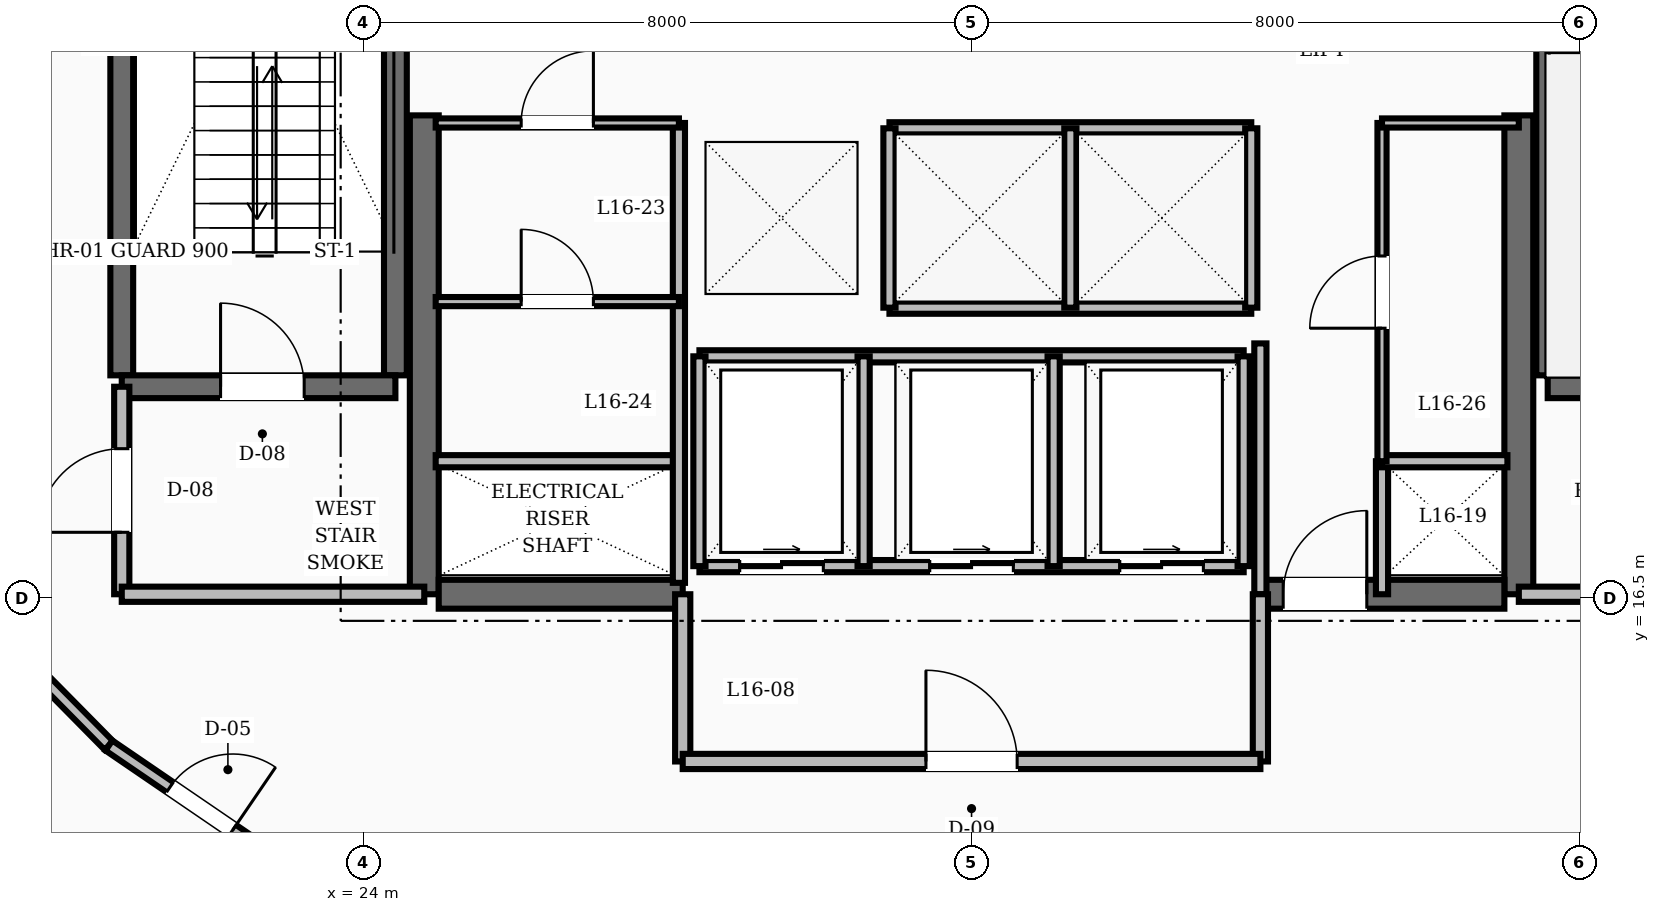
"""IFC4 building model, lengths in metres.
Left out: names, types, materials, properties, quantities, classifications, styles, units other than length and angle.
Written with IfcOpenShell. Run it as: python <this file> out.ifc"""

import sys

from ifc_helpers import new_model, si_unit, direction, frame, frame_2d, origin, place, context, subcontext, project, spatial, rectangle, extrude, element, fill, save


model = new_model("IFC4")
c1 = context("Model", 3, precision=1e-05, world=origin(), true_north=direction((0.0, 1.0)))
c2 = subcontext(c1, "Body", "Model", "MODEL_VIEW")
j1 = project(units=[si_unit("LENGTHUNIT", "METRE"), si_unit("PLANEANGLEUNIT", "RADIAN")], contexts=[c1])
p1 = place(None, origin())
s1 = spatial("IfcSite", under=j1, at=p1, CompositionType="ELEMENT")
p2 = place(p1, origin())
s2 = spatial("IfcBuilding", under=s1, at=p2, CompositionType="ELEMENT")
p3 = place(p2, frame((0.0, 0.0, 66.4)))
s3 = spatial("IfcBuildingStorey", under=s2, at=p3, CompositionType="ELEMENT", Elevation=66.4)
for number, where, z_axis, x_axis in (
    (1, (24.8, 16.55, 0.0), (0.0, 0.0, 1.0), (0.0, 1.0, 0.0)),
    (2, (39.2, 16.55, 0.0), (0.0, 0.0, 1.0), (0.0, 1.0, 0.0)),
):
    element("IfcWall", number, at=place(p3, frame(where, z_axis=z_axis, x_axis=x_axis)), inside=s3, PredefinedType="SHEAR", context=c2, shape_type="SweptSolid", body=[
        extrude(rectangle(XDim=6.3, YDim=0.38, at=frame_2d((3.15, 0.0))), origin(), (0.0, 0.0, 1.0), 3.6),
    ])
p4 = place(p3, frame((24.99, 16.55, 0.0), z_axis=(0.0, 0.0, 1.0), x_axis=(1.0, 0.0, 0.0)))
e3 = element("IfcWall", 3, at=p4, inside=s3, PredefinedType="SHEAR", context=c2, shape_type="SweptSolid", body=[
    extrude(rectangle(XDim=3.21, YDim=0.38, at=frame_2d((1.605, 0.0))), origin(), (0.0, 0.0, 1.0), 3.6),
])
p5 = place(p3, frame((35.8, 16.55, 0.0), z_axis=(0.0, 0.0, 1.0), x_axis=(1.0, 0.0, 0.0)))
e4 = element("IfcWall", 4, at=p5, inside=s3, PredefinedType="SHEAR", context=c2, shape_type="SweptSolid", body=[
    extrude(rectangle(XDim=3.21, YDim=0.38, at=frame_2d((1.605, 0.0))), origin(), (0.0, 0.0, 1.0), 3.6),
])
p6 = place(p5, frame((0.3, 0.0, 0.0)))
e5 = element("IfcOpeningElement", 5, at=p6, cuts=e4, PredefinedType="OPENING", context=c2, shape_type="SweptSolid", body=[
    extrude(rectangle(XDim=1.1, YDim=2.1, at=frame_2d((0.55, 1.05))), frame((0.0, 0.2, 0.0), z_axis=(0.0, -1.0, 0.0), x_axis=(1.0, 0.0, 0.0)), (0.0, 0.0, 1.0), 0.4),
])
for number, where, z_axis, x_axis in (
    (6, (20.82, 19.43, 0.0), (0.0, 0.0, 1.0), (0.0, 1.0, 0.0)),
    (7, (24.42, 19.43, 0.0), (0.0, 0.0, 1.0), (0.0, 1.0, 0.0)),
):
    element("IfcWall", number, at=place(p3, frame(where, z_axis=z_axis, x_axis=x_axis)), inside=s3, PredefinedType="SHEAR", context=c2, shape_type="SweptSolid", body=[
        extrude(rectangle(XDim=8.74, YDim=0.3, at=frame_2d((4.37, 0.0))), origin(), (0.0, 0.0, 1.0), 3.6),
    ])
p7 = place(p3, frame((20.82, 19.28, 0.0), z_axis=(0.0, 0.0, 1.0), x_axis=(1.0, 0.0, 0.0)))
e8 = element("IfcWall", 8, at=p7, inside=s3, PredefinedType="SHEAR", context=c2, shape_type="SweptSolid", body=[
    extrude(rectangle(XDim=3.6, YDim=0.3, at=frame_2d((1.8, 0.0))), origin(), (0.0, 0.0, 1.0), 3.6),
])
p8 = place(p7, frame((1.3, 0.0, 0.0)))
e9 = element("IfcOpeningElement", 9, at=p8, cuts=e8, PredefinedType="OPENING", context=c2, shape_type="SweptSolid", body=[
    extrude(rectangle(XDim=1.1, YDim=2.1, at=frame_2d((0.55, 1.05))), frame((0.0, 0.16, 0.0), z_axis=(0.0, -1.0, 0.0), x_axis=(1.0, 0.0, 0.0)), (0.0, 0.0, 1.0), 0.32),
])
p9 = place(p3, frame((39.58, 19.43, 0.0), z_axis=(0.0, 0.0, 1.0), x_axis=(0.0, 1.0, 0.0)))
e10 = element("IfcWall", 10, at=p9, inside=s3, PredefinedType="SHEAR", context=c2, shape_type="SweptSolid", body=[
    extrude(rectangle(XDim=8.74, YDim=0.3, at=frame_2d((4.37, 0.0))), origin(), (0.0, 0.0, 1.0), 3.6),
])
p10 = place(p3, frame((39.58, 19.28, 0.0), z_axis=(0.0, 0.0, 1.0), x_axis=(1.0, 0.0, 0.0)))
e11 = element("IfcWall", 11, at=p10, inside=s3, PredefinedType="SHEAR", context=c2, shape_type="SweptSolid", body=[
    extrude(rectangle(XDim=3.6, YDim=0.3, at=frame_2d((1.8, 0.0))), origin(), (0.0, 0.0, 1.0), 3.6),
])
p11 = place(p3, frame((20.82, 16.55, 0.0), z_axis=(0.0, 0.0, 1.0), x_axis=(0.0, 1.0, 0.0)))
e12 = element("IfcWall", 12, at=p11, inside=s3, PredefinedType="SOLIDWALL", context=c2, shape_type="SweptSolid", body=[
    extrude(rectangle(XDim=2.73, YDim=0.2, at=frame_2d((1.365, 0.0))), origin(), (0.0, 0.0, 1.0), 2.71),
])
p12 = place(p11, frame((0.815, 0.0, 0.0)))
e13 = element("IfcOpeningElement", 13, at=p12, cuts=e12, PredefinedType="OPENING", context=c2, shape_type="SweptSolid", body=[
    extrude(rectangle(XDim=1.1, YDim=2.1, at=frame_2d((0.55, 1.05))), frame((0.0, 0.11, 0.0), z_axis=(0.0, -1.0, 0.0), x_axis=(1.0, 0.0, 0.0)), (0.0, 0.0, 1.0), 0.22),
])
for number, where, z_axis, x_axis in (
    (14, (20.82, 16.55, 0.0), (0.0, 0.0, 1.0), (1.0, 0.0, 0.0)),
    (15, (39.2, 16.55, 0.0), (0.0, 0.0, 1.0), (1.0, 0.0, 0.0)),
):
    element("IfcWall", number, at=place(p3, frame(where, z_axis=z_axis, x_axis=x_axis)), inside=s3, PredefinedType="SOLIDWALL", context=c2, shape_type="SweptSolid", body=[
        extrude(rectangle(XDim=3.98, YDim=0.2, at=frame_2d((1.99, 0.0))), origin(), (0.0, 0.0, 1.0), 2.71),
    ])
p13 = place(p3, frame((35.8, 16.55, 0.0), z_axis=(0.0, 0.0, 1.0), x_axis=(0.0, 1.0, 0.0)))
e16 = element("IfcWall", 16, at=p13, inside=s3, PredefinedType="SOLIDWALL", context=c2, shape_type="SweptSolid", body=[
    extrude(rectangle(XDim=3.3, YDim=0.16, at=frame_2d((1.65, 0.0))), origin(), (0.0, 0.0, 1.0), 2.71),
])
p14 = place(p3, frame((37.4, 16.55, 0.0), z_axis=(0.0, 0.0, 1.0), x_axis=(0.0, 1.0, 0.0)))
e17 = element("IfcWall", 17, at=p14, inside=s3, PredefinedType="SOLIDWALL", context=c2, shape_type="SweptSolid", body=[
    extrude(rectangle(XDim=1.75, YDim=0.16, at=frame_2d((0.875, 0.0))), origin(), (0.0, 0.0, 1.0), 2.71),
])
for number, where, z_axis, x_axis in (
    (18, (28.2, 14.35, 0.0), (0.0, 0.0, 1.0), (0.0, 1.0, 0.0)),
    (19, (35.8, 14.35, 0.0), (0.0, 0.0, 1.0), (0.0, 1.0, 0.0)),
):
    element("IfcWall", number, at=place(p3, frame(where, z_axis=z_axis, x_axis=x_axis)), inside=s3, PredefinedType="SOLIDWALL", context=c2, shape_type="SweptSolid", body=[
        extrude(rectangle(XDim=2.2, YDim=0.2, at=frame_2d((1.1, 0.0))), origin(), (0.0, 0.0, 1.0), 2.71),
    ])
p15 = place(p3, frame((28.2, 14.35, 0.0), z_axis=(0.0, 0.0, 1.0), x_axis=(1.0, 0.0, 0.0)))
e20 = element("IfcWall", 20, at=p15, inside=s3, PredefinedType="SOLIDWALL", context=c2, shape_type="SweptSolid", body=[
    extrude(rectangle(XDim=7.6, YDim=0.2, at=frame_2d((3.8, 0.0))), origin(), (0.0, 0.0, 1.0), 2.71),
])
p16 = place(p15, frame((3.2, 0.0, 0.0)))
e21 = element("IfcOpeningElement", 21, at=p16, cuts=e20, PredefinedType="OPENING", context=c2, shape_type="SweptSolid", body=[
    extrude(rectangle(XDim=1.2, YDim=2.1, at=frame_2d((0.6, 1.05))), frame((0.0, 0.11, 0.0), z_axis=(0.0, -1.0, 0.0), x_axis=(1.0, 0.0, 0.0)), (0.0, 0.0, 1.0), 0.22),
])
for number, where, z_axis, x_axis in (
    (22, (30.92, 22.68, 0.0), (0.0, 0.0, 1.0), (1.0, 0.0, 0.0)),
    (23, (30.92, 20.32, 0.0), (0.0, 0.0, 1.0), (1.0, 0.0, 0.0)),
):
    element("IfcWall", number, at=place(p3, frame(where, z_axis=z_axis, x_axis=x_axis)), inside=s3, PredefinedType="SOLIDWALL", context=c2, shape_type="SweptSolid", body=[
        extrude(rectangle(XDim=4.76, YDim=0.16, at=frame_2d((2.38, 0.0))), origin(), (0.0, 0.0, 1.0), 2.71),
    ])
for number, where, z_axis, x_axis in (
    (24, (30.92, 20.32, 0.0), (0.0, 0.0, 1.0), (0.0, 1.0, 0.0)),
    (25, (33.3, 20.32, 0.0), (0.0, 0.0, 1.0), (0.0, 1.0, 0.0)),
    (26, (35.68, 20.32, 0.0), (0.0, 0.0, 1.0), (0.0, 1.0, 0.0)),
):
    element("IfcWall", number, at=place(p3, frame(where, z_axis=z_axis, x_axis=x_axis)), inside=s3, PredefinedType="SOLIDWALL", context=c2, shape_type="SweptSolid", body=[
        extrude(rectangle(XDim=2.36, YDim=0.16, at=frame_2d((1.18, 0.0))), origin(), (0.0, 0.0, 1.0), 2.71),
    ])
p17 = place(p3, frame((28.42, 16.92, 0.0), z_axis=(0.0, 0.0, 1.0), x_axis=(1.0, 0.0, 0.0)))
e27 = element("IfcWall", 27, at=p17, inside=s3, PredefinedType="SOLIDWALL", context=c2, shape_type="SweptSolid", body=[
    extrude(rectangle(XDim=7.16, YDim=0.16, at=frame_2d((3.58, 0.0))), origin(), (0.0, 0.0, 1.0), 2.71),
])
p18 = place(p17, frame((0.53, 0.0, 0.0)))
e28 = element("IfcOpeningElement", 28, at=p18, cuts=e27, PredefinedType="OPENING", context=c2, shape_type="SweptSolid", body=[
    extrude(rectangle(XDim=1.1, YDim=2.15, at=frame_2d((0.55, 1.075))), frame((0.0, 0.09, 0.0), z_axis=(0.0, -1.0, 0.0), x_axis=(1.0, 0.0, 0.0)), (0.0, 0.0, 1.0), 0.18),
])
p19 = place(p17, frame((3.03, 0.0, 0.0)))
e29 = element("IfcOpeningElement", 29, at=p19, cuts=e27, PredefinedType="OPENING", context=c2, shape_type="SweptSolid", body=[
    extrude(rectangle(XDim=1.1, YDim=2.15, at=frame_2d((0.55, 1.075))), frame((0.0, 0.09, 0.0), z_axis=(0.0, -1.0, 0.0), x_axis=(1.0, 0.0, 0.0)), (0.0, 0.0, 1.0), 0.18),
])
p20 = place(p17, frame((5.53, 0.0, 0.0)))
e30 = element("IfcOpeningElement", 30, at=p20, cuts=e27, PredefinedType="OPENING", context=c2, shape_type="SweptSolid", body=[
    extrude(rectangle(XDim=1.1, YDim=2.15, at=frame_2d((0.55, 1.075))), frame((0.0, 0.09, 0.0), z_axis=(0.0, -1.0, 0.0), x_axis=(1.0, 0.0, 0.0)), (0.0, 0.0, 1.0), 0.18),
])
p21 = place(p3, frame((28.42, 19.68, 0.0), z_axis=(0.0, 0.0, 1.0), x_axis=(1.0, 0.0, 0.0)))
e31 = element("IfcWall", 31, at=p21, inside=s3, PredefinedType="SOLIDWALL", context=c2, shape_type="SweptSolid", body=[
    extrude(rectangle(XDim=7.16, YDim=0.16, at=frame_2d((3.58, 0.0))), origin(), (0.0, 0.0, 1.0), 2.71),
])
for number, where, z_axis, x_axis in (
    (32, (28.42, 16.92, 0.0), (0.0, 0.0, 1.0), (0.0, 1.0, 0.0)),
    (33, (30.58, 16.92, 0.0), (0.0, 0.0, 1.0), (0.0, 1.0, 0.0)),
    (34, (33.08, 16.92, 0.0), (0.0, 0.0, 1.0), (0.0, 1.0, 0.0)),
    (35, (35.58, 16.92, 0.0), (0.0, 0.0, 1.0), (0.0, 1.0, 0.0)),
):
    element("IfcWall", number, at=place(p3, frame(where, z_axis=z_axis, x_axis=x_axis)), inside=s3, PredefinedType="SOLIDWALL", context=c2, shape_type="SweptSolid", body=[
        extrude(rectangle(XDim=2.76, YDim=0.16, at=frame_2d((1.38, 0.0))), origin(), (0.0, 0.0, 1.0), 2.71),
    ])
p22 = place(p3, frame((24.95, 18.3, 0.0), z_axis=(0.0, 0.0, 1.0), x_axis=(1.0, 0.0, 0.0)))
e36 = element("IfcWall", 36, at=p22, inside=s3, PredefinedType="SOLIDWALL", context=c2, shape_type="SweptSolid", body=[
    extrude(rectangle(XDim=3.2, YDim=0.16, at=frame_2d((1.6, 0.0))), origin(), (0.0, 0.0, 1.0), 2.71),
])
p23 = place(p3, frame((28.15, 16.7, 0.0), z_axis=(0.0, 0.0, 1.0), x_axis=(0.0, 1.0, 0.0)))
e37 = element("IfcWall", 37, at=p23, inside=s3, PredefinedType="SOLIDWALL", context=c2, shape_type="SweptSolid", body=[
    extrude(rectangle(XDim=6.05, YDim=0.16, at=frame_2d((3.025, 0.0))), origin(), (0.0, 0.0, 1.0), 2.71),
])
p24 = place(p3, frame((37.4, 18.3, 0.0), z_axis=(0.0, 0.0, 1.0), x_axis=(1.0, 0.0, 0.0)))
e38 = element("IfcWall", 38, at=p24, inside=s3, PredefinedType="SOLIDWALL", context=c2, shape_type="SweptSolid", body=[
    extrude(rectangle(XDim=1.65, YDim=0.16, at=frame_2d((0.825, 0.0))), origin(), (0.0, 0.0, 1.0), 2.71),
])
p25 = place(p3, frame((24.95, 22.75, 0.0), z_axis=(0.0, 0.0, 1.0), x_axis=(1.0, 0.0, 0.0)))
e39 = element("IfcWall", 39, at=p25, inside=s3, PredefinedType="PARTITIONING", context=c2, shape_type="SweptSolid", body=[
    extrude(rectangle(XDim=3.2, YDim=0.12, at=frame_2d((1.6, 0.0))), origin(), (0.0, 0.0, 1.0), 2.71),
])
p26 = place(p25, frame((1.125, 0.0, 0.0)))
e40 = element("IfcOpeningElement", 40, at=p26, cuts=e39, PredefinedType="OPENING", context=c2, shape_type="SweptSolid", body=[
    extrude(rectangle(XDim=0.95, YDim=2.1, at=frame_2d((0.475, 1.05))), frame((0.0, 0.07, 0.0), z_axis=(0.0, -1.0, 0.0), x_axis=(1.0, 0.0, 0.0)), (0.0, 0.0, 1.0), 0.14),
])
p27 = place(p3, frame((37.4, 18.3, 0.0), z_axis=(0.0, 0.0, 1.0), x_axis=(0.0, 1.0, 0.0)))
e41 = element("IfcWall", 41, at=p27, inside=s3, PredefinedType="PARTITIONING", context=c2, shape_type="SweptSolid", body=[
    extrude(rectangle(XDim=4.45, YDim=0.12, at=frame_2d((2.225, 0.0))), origin(), (0.0, 0.0, 1.0), 2.71),
])
p28 = place(p27, frame((1.75, 0.0, 0.0)))
e42 = element("IfcOpeningElement", 42, at=p28, cuts=e41, PredefinedType="OPENING", context=c2, shape_type="SweptSolid", body=[
    extrude(rectangle(XDim=0.95, YDim=2.1, at=frame_2d((0.475, 1.05))), frame((0.0, 0.07, 0.0), z_axis=(0.0, -1.0, 0.0), x_axis=(1.0, 0.0, 0.0)), (0.0, 0.0, 1.0), 0.14),
])
p29 = place(p3, frame((37.4, 22.75, 0.0), z_axis=(0.0, 0.0, 1.0), x_axis=(1.0, 0.0, 0.0)))
e43 = element("IfcWall", 43, at=p29, inside=s3, PredefinedType="PARTITIONING", context=c2, shape_type="SweptSolid", body=[
    extrude(rectangle(XDim=1.8, YDim=0.12, at=frame_2d((0.9, 0.0))), origin(), (0.0, 0.0, 1.0), 2.71),
])
p30 = place(p3, frame((24.95, 20.4, 0.0), z_axis=(0.0, 0.0, 1.0), x_axis=(1.0, 0.0, 0.0)))
e44 = element("IfcWall", 44, at=p30, inside=s3, PredefinedType="PARTITIONING", context=c2, shape_type="SweptSolid", body=[
    extrude(rectangle(XDim=3.2, YDim=0.12, at=frame_2d((1.6, 0.0))), origin(), (0.0, 0.0, 1.0), 2.71),
])
p31 = place(p30, frame((1.125, 0.0, 0.0)))
e45 = element("IfcOpeningElement", 45, at=p31, cuts=e44, PredefinedType="OPENING", context=c2, shape_type="SweptSolid", body=[
    extrude(rectangle(XDim=0.95, YDim=2.1, at=frame_2d((0.475, 1.05))), frame((0.0, 0.07, 0.0), z_axis=(0.0, -1.0, 0.0), x_axis=(1.0, 0.0, 0.0)), (0.0, 0.0, 1.0), 0.14),
])
p32 = place(p3, frame((18.655, 16.583, 0.0), z_axis=(0.0, 0.0, 1.0), x_axis=(0.702366174226, -0.711815816981, 0.0)))
e46 = element("IfcWall", 46, at=p32, inside=s3, PredefinedType="SOLIDWALL", context=c2, shape_type="SweptSolid", body=[
    extrude(rectangle(XDim=2.842, YDim=0.16, at=frame_2d((1.421, 0.0))), origin(), (0.0, 0.0, 1.0), 2.71),
])
p33 = place(p3, frame((20.651, 14.56, 0.0), z_axis=(0.0, 0.0, 1.0), x_axis=(0.825929039072, -0.563774088104, 0.0)))
e47 = element("IfcWall", 47, at=p33, inside=s3, PredefinedType="SOLIDWALL", context=c2, shape_type="SweptSolid", body=[
    extrude(rectangle(XDim=2.945, YDim=0.16, at=frame_2d((1.472, 0.0))), origin(), (0.0, 0.0, 1.0), 2.71),
])
p34 = place(p33, frame((0.972, 0.0, 0.0)))
e48 = element("IfcOpeningElement", 48, at=p34, cuts=e47, PredefinedType="OPENING", context=c2, shape_type="SweptSolid", body=[
    extrude(rectangle(XDim=1.0, YDim=2.1, at=frame_2d((0.5, 1.05))), frame((0.0, 0.09, 0.0), z_axis=(0.0, -1.0, 0.0), x_axis=(1.0, 0.0, 0.0)), (0.0, 0.0, 1.0), 0.18),
])
p35 = place(p8, origin())
e49 = element("IfcDoor", 49, at=p35, inside=s3, OperationType="SINGLE_SWING_LEFT", PredefinedType="DOOR", context=c2, shape_type="SweptSolid", body=[
    extrude(rectangle(XDim=1.1, YDim=2.1, at=frame_2d((0.55, 1.05))), frame((0.0, 0.025, 0.0), z_axis=(0.0, -1.0, 0.0), x_axis=(1.0, 0.0, 0.0)), (0.0, 0.0, 1.0), 0.05),
])
fill(e9, e49)
p36 = place(p12, origin())
e50 = element("IfcDoor", 50, at=p36, inside=s3, OperationType="SINGLE_SWING_LEFT", PredefinedType="DOOR", context=c2, shape_type="SweptSolid", body=[
    extrude(rectangle(XDim=1.1, YDim=2.1, at=frame_2d((0.55, 1.05))), frame((0.0, 0.025, 0.0), z_axis=(0.0, -1.0, 0.0), x_axis=(1.0, 0.0, 0.0)), (0.0, 0.0, 1.0), 0.05),
])
fill(e13, e50)
p37 = place(p6, origin())
e51 = element("IfcDoor", 51, at=p37, inside=s3, OperationType="SINGLE_SWING_RIGHT", PredefinedType="DOOR", context=c2, shape_type="SweptSolid", body=[
    extrude(rectangle(XDim=1.1, YDim=2.1, at=frame_2d((0.55, 1.05))), frame((0.0, 0.025, 0.0), z_axis=(0.0, -1.0, 0.0), x_axis=(1.0, 0.0, 0.0)), (0.0, 0.0, 1.0), 0.05),
])
fill(e5, e51)
p38 = place(p16, origin())
e52 = element("IfcDoor", 52, at=p38, inside=s3, OperationType="SINGLE_SWING_LEFT", PredefinedType="DOOR", context=c2, shape_type="SweptSolid", body=[
    extrude(rectangle(XDim=1.2, YDim=2.1, at=frame_2d((0.6, 1.05))), frame((0.0, 0.025, 0.0), z_axis=(0.0, -1.0, 0.0), x_axis=(1.0, 0.0, 0.0)), (0.0, 0.0, 1.0), 0.05),
])
fill(e21, e52)
p39 = place(p18, origin())
e53 = element("IfcDoor", 53, at=p39, inside=s3, OperationType="SLIDING_TO_RIGHT", PredefinedType="DOOR", context=c2, shape_type="SweptSolid", body=[
    extrude(rectangle(XDim=1.1, YDim=2.15, at=frame_2d((0.55, 1.075))), frame((0.0, 0.025, 0.0), z_axis=(0.0, -1.0, 0.0), x_axis=(1.0, 0.0, 0.0)), (0.0, 0.0, 1.0), 0.05),
])
fill(e28, e53)
p40 = place(p19, origin())
e54 = element("IfcDoor", 54, at=p40, inside=s3, OperationType="SLIDING_TO_RIGHT", PredefinedType="DOOR", context=c2, shape_type="SweptSolid", body=[
    extrude(rectangle(XDim=1.1, YDim=2.15, at=frame_2d((0.55, 1.075))), frame((0.0, 0.025, 0.0), z_axis=(0.0, -1.0, 0.0), x_axis=(1.0, 0.0, 0.0)), (0.0, 0.0, 1.0), 0.05),
])
fill(e29, e54)
p41 = place(p20, origin())
e55 = element("IfcDoor", 55, at=p41, inside=s3, OperationType="SLIDING_TO_RIGHT", PredefinedType="DOOR", context=c2, shape_type="SweptSolid", body=[
    extrude(rectangle(XDim=1.1, YDim=2.15, at=frame_2d((0.55, 1.075))), frame((0.0, 0.025, 0.0), z_axis=(0.0, -1.0, 0.0), x_axis=(1.0, 0.0, 0.0)), (0.0, 0.0, 1.0), 0.05),
])
fill(e30, e55)
p42 = place(p26, origin())
e56 = element("IfcDoor", 56, at=p42, inside=s3, OperationType="SINGLE_SWING_RIGHT", PredefinedType="DOOR", context=c2, shape_type="SweptSolid", body=[
    extrude(rectangle(XDim=0.95, YDim=2.1, at=frame_2d((0.475, 1.05))), frame((0.0, 0.025, 0.0), z_axis=(0.0, -1.0, 0.0), x_axis=(1.0, 0.0, 0.0)), (0.0, 0.0, 1.0), 0.05),
])
fill(e40, e56)
p43 = place(p31, origin())
e57 = element("IfcDoor", 57, at=p43, inside=s3, OperationType="SINGLE_SWING_LEFT", PredefinedType="DOOR", context=c2, shape_type="SweptSolid", body=[
    extrude(rectangle(XDim=0.95, YDim=2.1, at=frame_2d((0.475, 1.05))), frame((0.0, 0.025, 0.0), z_axis=(0.0, -1.0, 0.0), x_axis=(1.0, 0.0, 0.0)), (0.0, 0.0, 1.0), 0.05),
])
fill(e45, e57)
p44 = place(p28, origin())
e58 = element("IfcDoor", 58, at=p44, inside=s3, OperationType="SINGLE_SWING_LEFT", PredefinedType="DOOR", context=c2, shape_type="SweptSolid", body=[
    extrude(rectangle(XDim=0.95, YDim=2.1, at=frame_2d((0.475, 1.05))), frame((0.0, 0.025, 0.0), z_axis=(0.0, -1.0, 0.0), x_axis=(1.0, 0.0, 0.0)), (0.0, 0.0, 1.0), 0.05),
])
fill(e42, e58)
p45 = place(p34, origin())
e59 = element("IfcDoor", 59, at=p45, inside=s3, OperationType="SINGLE_SWING_RIGHT", PredefinedType="DOOR", context=c2, shape_type="SweptSolid", body=[
    extrude(rectangle(XDim=1.0, YDim=2.1, at=frame_2d((0.5, 1.05))), frame((0.0, 0.025, 0.0), z_axis=(0.0, -1.0, 0.0), x_axis=(1.0, 0.0, 0.0)), (0.0, 0.0, 1.0), 0.05),
])
fill(e48, e59)
save(model, sys.argv[1])
